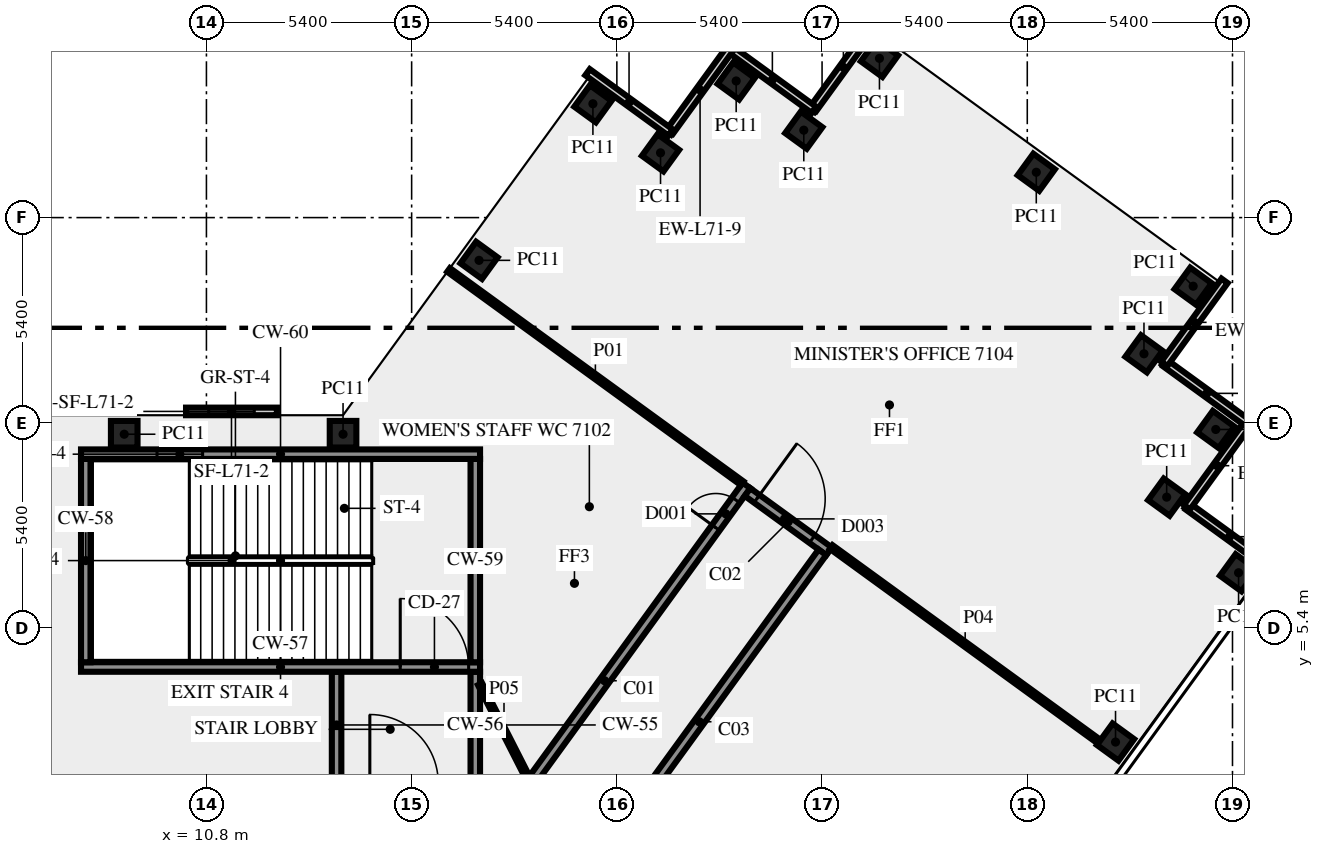
"""IFC4 building model, lengths in metres.
Left out: names, types, materials, properties, quantities, classifications, styles, units other than length and angle.
Written with IfcOpenShell. Run it as: python <this file> out.ifc"""

import sys

from ifc_helpers import new_model, si_unit, direction, frame, frame_2d, origin, origin_2d, place, context, subcontext, project, spatial, rectangle, extrude, element, fill, save


model = new_model("IFC4")
c1 = context("Model", 3, precision=1e-05, world=origin(), true_north=direction((0.0, 1.0)))
c2 = subcontext(c1, "Body", "Model", "MODEL_VIEW")
j1 = project(units=[si_unit("LENGTHUNIT", "METRE"), si_unit("PLANEANGLEUNIT", "RADIAN")], contexts=[c1])
p1 = place(None, origin())
s1 = spatial("IfcSite", under=j1, at=p1, CompositionType="ELEMENT")
p2 = place(p1, origin())
s2 = spatial("IfcBuilding", under=s1, at=p2, CompositionType="ELEMENT")
p3 = place(p2, frame((0.0, 0.0, 307.0)))
s3 = spatial("IfcBuildingStorey", under=s2, at=p3, CompositionType="ELEMENT", Elevation=307.0)
for number, where, z_axis, x_axis in (
    (1, (34.722, 2.4, 0.0), (0.0, 0.0, 1.0), (0.588, 0.809, 0.0)),
    (2, (37.96, 6.855, 0.0), (0.0, 0.0, 1.0), (0.588, 0.809, 0.0)),
    (3, (36.068, 8.844, 0.0), (0.0, 0.0, 1.0), (0.588, 0.809, 0.0)),
    (4, (37.36, 10.625, 0.0), (0.0, 0.0, 1.0), (0.588, 0.809, 0.0)),
    (5, (35.471, 12.616, 0.0), (0.0, 0.0, 1.0), (-0.809, 0.588, 0.0)),
    (6, (36.765, 14.395, 0.0), (0.0, 0.0, 1.0), (-0.809, 0.588, 0.0)),
    (7, (32.637, 17.393, 0.0), (0.0, 0.0, 1.0), (-0.809, 0.588, 0.0)),
    (8, (28.51, 20.39, 0.0), (0.0, 0.0, 1.0), (-0.588, -0.809, 0.0)),
    (9, (26.519, 18.5, 0.0), (0.0, 0.0, 1.0), (-0.809, 0.588, 0.0)),
    (10, (24.74, 19.795, 0.0), (0.0, 0.0, 1.0), (-0.588, -0.809, 0.0)),
    (11, (22.749, 17.904, 0.0), (0.0, 0.0, 1.0), (-0.588, -0.809, 0.0)),
    (12, (20.97, 19.195, 0.0), (0.0, 0.0, 1.0), (-0.588, -0.809, 0.0)),
    (13, (17.974, 15.075, 0.0), (0.0, 0.0, 1.0), (-0.588, -0.809, 0.0)),
    (14, (14.395, 10.5, 0.0), (0.0, 0.0, 1.0), (-1.0, 0.0, 0.0)),
    (15, (8.637, 10.5, 0.0), (0.0, 0.0, 1.0), (-1.0, 0.0, 0.0)),
):
    element("IfcColumn", number, at=place(p3, frame(where, z_axis=z_axis, x_axis=x_axis)), inside=s3, PredefinedType="COLUMN", context=c2, shape_type="SweptSolid", body=[
        extrude(rectangle(XDim=0.7, YDim=0.7, at=origin_2d()), origin(), (0.0, 0.0, 1.0), 3.65),
    ])
for number, where, z_axis, x_axis in (
    (16, (38.814, 7.01, 0.0), (0.0, 0.0, 1.0), (-0.809, 0.588, 0.0)),
    (17, (36.602, 8.58, 0.0), (0.0, 0.0, 1.0), (0.588, 0.809, 0.0)),
    (18, (38.216, 10.782, 0.0), (0.0, 0.0, 1.0), (-0.809, 0.588, 0.0)),
    (19, (36.005, 12.352, 0.0), (0.0, 0.0, 1.0), (0.588, 0.809, 0.0)),
):
    element("IfcWall", number, at=place(p3, frame(where, z_axis=z_axis, x_axis=x_axis)), inside=s3, PredefinedType="SOLIDWALL", context=c2, shape_type="SweptSolid", body=[
        extrude(rectangle(XDim=2.7, YDim=0.2, at=frame_2d((1.35, 0.0))), origin(), (0.0, 0.0, 1.0), 3.65),
    ])
for number, where, z_axis, x_axis in (
    (20, (28.354, 21.247, 0.0), (0.0, 0.0, 1.0), (-0.588, -0.809, 0.0)),
    (21, (26.785, 19.036, 0.0), (0.0, 0.0, 1.0), (-0.809, 0.588, 0.0)),
):
    element("IfcWall", number, at=place(p3, frame(where, z_axis=z_axis, x_axis=x_axis)), inside=s3, PredefinedType="SOLIDWALL", context=c2, shape_type="SweptSolid", body=[
        extrude(rectangle(XDim=2.7, YDim=0.2, at=frame_2d((1.35, 0.0))), origin(), (0.0, 0.0, 1.0), 3.65),
    ])
for number, where, z_axis, x_axis in (
    (22, (24.583, 20.65, 0.0), (0.0, 0.0, 1.0), (-0.588, -0.809, 0.0)),
    (23, (23.013, 18.438, 0.0), (0.0, 0.0, 1.0), (-0.809, 0.588, 0.0)),
):
    element("IfcWall", number, at=place(p3, frame(where, z_axis=z_axis, x_axis=x_axis)), inside=s3, PredefinedType="SOLIDWALL", context=c2, shape_type="SweptSolid", body=[
        extrude(rectangle(XDim=2.7, YDim=0.2, at=frame_2d((1.35, 0.0))), origin(), (0.0, 0.0, 1.0), 3.65),
    ])
p4 = place(p3, frame((12.655, 11.1, 0.0), z_axis=(0.0, 0.0, 1.0), x_axis=(-1.0, 0.0, 0.0)))
e24 = element("IfcWall", 24, at=p4, inside=s3, PredefinedType="SOLIDWALL", context=c2, shape_type="SweptSolid", body=[
    extrude(rectangle(XDim=2.392, YDim=0.2, at=frame_2d((1.196, 0.0))), origin(), (0.0, 0.0, 1.0), 3.65),
])
p5 = place(p4, frame((0.596, 0.0, 1.0)))
e25 = element("IfcOpeningElement", 25, at=p5, cuts=e24, PredefinedType="OPENING", context=c2, shape_type="SweptSolid", body=[
    extrude(rectangle(XDim=1.2, YDim=1.2, at=frame_2d((0.6, 0.6))), frame((0.0, 0.11, 0.0), z_axis=(0.0, -1.0, 0.0), x_axis=(1.0, 0.0, 0.0)), (0.0, 0.0, 1.0), 0.22),
])
for number, where, z_axis, x_axis in (
    (26, (14.225, 1.45, 0.0), (0.0, 0.0, 1.0), (0.0, 1.0, 0.0)),
    (27, (17.875, 1.45, 0.0), (0.0, 0.0, 1.0), (0.0, 1.0, 0.0)),
):
    element("IfcWall", number, at=place(p3, frame(where, z_axis=z_axis, x_axis=x_axis)), inside=s3, PredefinedType="SHEAR", context=c2, shape_type="SweptSolid", body=[
        extrude(rectangle(XDim=2.8, YDim=0.25, at=frame_2d((1.4, 0.0))), origin(), (0.0, 0.0, 1.0), 3.65),
    ])
p6 = place(p3, frame((7.5, 4.375, 0.0), z_axis=(0.0, 0.0, 1.0), x_axis=(1.0, 0.0, 0.0)))
e28 = element("IfcWall", 28, at=p6, inside=s3, PredefinedType="SHEAR", context=c2, shape_type="SweptSolid", body=[
    extrude(rectangle(XDim=10.5, YDim=0.25, at=frame_2d((5.25, 0.0))), origin(), (0.0, 0.0, 1.0), 3.65),
])
p7 = place(p6, frame((8.4, 0.0, 0.0)))
e29 = element("IfcOpeningElement", 29, at=p7, cuts=e28, PredefinedType="OPENING", context=c2, shape_type="SweptSolid", body=[
    extrude(rectangle(XDim=1.8, YDim=2.1, at=frame_2d((0.9, 1.05))), frame((0.0, 0.135, 0.0), z_axis=(0.0, -1.0, 0.0), x_axis=(1.0, 0.0, 0.0)), (0.0, 0.0, 1.0), 0.27),
])
for number, where, z_axis, x_axis in (
    (30, (7.625, 4.5, 0.0), (0.0, 0.0, 1.0), (0.0, 1.0, 0.0)),
    (31, (17.875, 4.5, 0.0), (0.0, 0.0, 1.0), (0.0, 1.0, 0.0)),
):
    element("IfcWall", number, at=place(p3, frame(where, z_axis=z_axis, x_axis=x_axis)), inside=s3, PredefinedType="SHEAR", context=c2, shape_type="SweptSolid", body=[
        extrude(rectangle(XDim=5.35, YDim=0.25, at=frame_2d((2.675, 0.0))), origin(), (0.0, 0.0, 1.0), 3.65),
    ])
p8 = place(p3, frame((7.5, 9.975, 0.0), z_axis=(0.0, 0.0, 1.0), x_axis=(1.0, 0.0, 0.0)))
e32 = element("IfcWall", 32, at=p8, inside=s3, PredefinedType="SHEAR", context=c2, shape_type="SweptSolid", body=[
    extrude(rectangle(XDim=10.5, YDim=0.25, at=frame_2d((5.25, 0.0))), origin(), (0.0, 0.0, 1.0), 3.65),
])
p9 = place(p8, frame((2.0, 0.0, 1.0)))
e33 = element("IfcOpeningElement", 33, at=p9, cuts=e32, PredefinedType="OPENING", context=c2, shape_type="SweptSolid", body=[
    extrude(rectangle(XDim=1.2, YDim=1.2, at=frame_2d((0.6, 0.6))), frame((0.0, 0.135, 0.0), z_axis=(0.0, -1.0, 0.0), x_axis=(1.0, 0.0, 0.0)), (0.0, 0.0, 1.0), 0.27),
])
p10 = place(p3, frame((17.545, -1.125, 0.0), z_axis=(0.0, 0.0, 1.0), x_axis=(0.587796810203, 0.809008596935, 0.0)))
e34 = element("IfcWall", 34, at=p10, inside=s3, PredefinedType="SOLIDWALL", context=c2, shape_type="SweptSolid", body=[
    extrude(rectangle(XDim=12.703, YDim=0.25, at=frame_2d((6.352, 0.0))), origin(), (0.0, 0.0, 1.0), 3.65),
])
p11 = place(p10, frame((11.329, 0.0, 0.0)))
e35 = element("IfcOpeningElement", 35, at=p11, cuts=e34, PredefinedType="OPENING", context=c2, shape_type="SweptSolid", body=[
    extrude(rectangle(XDim=0.9, YDim=2.1, at=frame_2d((0.45, 1.05))), frame((0.0, 0.135, 0.0), z_axis=(0.0, -1.0, 0.0), x_axis=(1.0, 0.0, 0.0)), (0.0, 0.0, 1.0), 0.27),
])
p12 = place(p3, frame((25.039, 8.978, 0.0), z_axis=(0.0, 0.0, 1.0), x_axis=(0.809006914995, -0.587799125119, 0.0)))
e36 = element("IfcWall", 36, at=p12, inside=s3, PredefinedType="SOLIDWALL", context=c2, shape_type="SweptSolid", body=[
    extrude(rectangle(XDim=2.65, YDim=0.25, at=frame_2d((1.325, 0.0))), origin(), (0.0, 0.0, 1.0), 3.65),
])
p13 = place(p12, frame((0.301, 0.0, 0.0)))
e37 = element("IfcOpeningElement", 37, at=p13, cuts=e36, PredefinedType="OPENING", context=c2, shape_type="SweptSolid", body=[
    extrude(rectangle(XDim=1.8, YDim=2.1, at=frame_2d((0.9, 1.05))), frame((0.0, 0.135, 0.0), z_axis=(0.0, -1.0, 0.0), x_axis=(1.0, 0.0, 0.0)), (0.0, 0.0, 1.0), 0.27),
])
p14 = place(p3, frame((27.009, 7.392, 0.0), z_axis=(0.0, 0.0, 1.0), x_axis=(-0.587776457057, -0.809023384414, 0.0)))
e38 = element("IfcWall", 38, at=p14, inside=s3, PredefinedType="SOLIDWALL", context=c2, shape_type="SweptSolid", body=[
    extrude(rectangle(XDim=11.021, YDim=0.25, at=frame_2d((5.51, 0.0))), origin(), (0.0, 0.0, 1.0), 3.65),
])
p15 = place(p14, frame((9.588, 0.0, 0.0)))
e39 = element("IfcOpeningElement", 39, at=p15, cuts=e38, PredefinedType="OPENING", context=c2, shape_type="SweptSolid", body=[
    extrude(rectangle(XDim=0.9, YDim=2.1, at=frame_2d((0.45, 1.05))), frame((0.0, 0.135, 0.0), z_axis=(0.0, -1.0, 0.0), x_axis=(1.0, 0.0, 0.0)), (0.0, 0.0, 1.0), 0.27),
])
p16 = place(p3, frame((24.898, 9.209, 0.0), z_axis=(0.0, 0.0, 1.0), x_axis=(-0.809013490065, 0.587790075531, 0.0)))
e40 = element("IfcWall", 40, at=p16, inside=s3, PredefinedType="PARTITIONING", context=c2, shape_type="SweptSolid", body=[
    extrude(rectangle(XDim=9.549, YDim=0.12, at=frame_2d((4.775, 0.0))), origin(), (0.0, 0.0, 1.0), 2.95),
])
p17 = place(p3, frame((27.24, 7.532, 0.0), z_axis=(0.0, 0.0, 1.0), x_axis=(0.809027940177, -0.587770186393, 0.0)))
e41 = element("IfcWall", 41, at=p17, inside=s3, PredefinedType="PARTITIONING", context=c2, shape_type="SweptSolid", body=[
    extrude(rectangle(XDim=8.715, YDim=0.12, at=frame_2d((4.357, 0.0))), origin(), (0.0, 0.0, 1.0), 3.65),
])
p18 = place(p3, frame((18.0, 3.925, 0.0), z_axis=(0.0, 0.0, 1.0), x_axis=(0.453950796792, -0.891026752736, 0.0)))
e42 = element("IfcWall", 42, at=p18, inside=s3, PredefinedType="PARTITIONING", context=c2, shape_type="SweptSolid", body=[
    extrude(rectangle(XDim=2.778, YDim=0.12, at=frame_2d((1.389, 0.0))), origin(), (0.0, 0.0, 1.0), 3.65),
])
p19 = place(p5, origin())
e43 = element("IfcWindow", 43, at=p19, inside=s3, PartitioningType="SINGLE_PANEL", PredefinedType="WINDOW", context=c2, shape_type="SweptSolid", body=[
    extrude(rectangle(XDim=1.2, YDim=1.2, at=frame_2d((0.6, 0.6))), frame((0.0, 0.03, 0.0), z_axis=(0.0, -1.0, 0.0), x_axis=(1.0, 0.0, 0.0)), (0.0, 0.0, 1.0), 0.06),
])
fill(e25, e43)
p20 = place(p7, origin())
e44 = element("IfcDoor", 44, at=p20, inside=s3, OperationType="DOUBLE_DOOR_SINGLE_SWING", PredefinedType="DOOR", context=c2, shape_type="SweptSolid", body=[
    extrude(rectangle(XDim=1.8, YDim=2.1, at=frame_2d((0.9, 1.05))), frame((0.0, 0.025, 0.0), z_axis=(0.0, -1.0, 0.0), x_axis=(1.0, 0.0, 0.0)), (0.0, 0.0, 1.0), 0.05),
])
fill(e29, e44)
p21 = place(p9, origin())
e45 = element("IfcWindow", 45, at=p21, inside=s3, PartitioningType="SINGLE_PANEL", PredefinedType="WINDOW", context=c2, shape_type="SweptSolid", body=[
    extrude(rectangle(XDim=1.2, YDim=1.2, at=frame_2d((0.6, 0.6))), frame((0.0, 0.03, 0.0), z_axis=(0.0, -1.0, 0.0), x_axis=(1.0, 0.0, 0.0)), (0.0, 0.0, 1.0), 0.06),
])
fill(e33, e45)
p22 = place(p11, origin())
e46 = element("IfcDoor", 46, at=p22, inside=s3, OperationType="SINGLE_SWING_RIGHT", PredefinedType="DOOR", context=c2, shape_type="SweptSolid", body=[
    extrude(rectangle(XDim=0.9, YDim=2.1, at=frame_2d((0.45, 1.05))), frame((0.0, 0.025, 0.0), z_axis=(0.0, -1.0, 0.0), x_axis=(1.0, 0.0, 0.0)), (0.0, 0.0, 1.0), 0.05),
])
fill(e35, e46)
p23 = place(p13, origin())
e47 = element("IfcDoor", 47, at=p23, inside=s3, OperationType="DOUBLE_DOOR_SINGLE_SWING", PredefinedType="DOOR", context=c2, shape_type="SweptSolid", body=[
    extrude(rectangle(XDim=1.8, YDim=2.1, at=frame_2d((0.9, 1.05))), frame((0.0, 0.025, 0.0), z_axis=(0.0, -1.0, 0.0), x_axis=(1.0, 0.0, 0.0)), (0.0, 0.0, 1.0), 0.05),
])
fill(e37, e47)
save(model, sys.argv[1])
